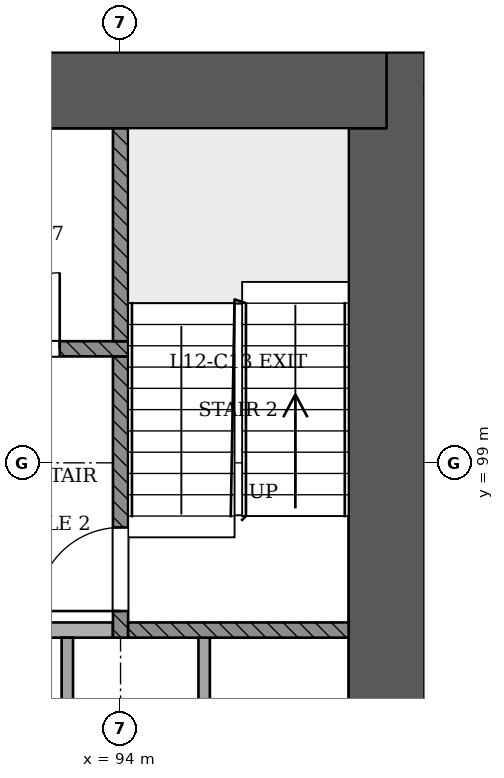
"""IFC4 building model, lengths in metres.
Left out: names, types, materials, properties, quantities, classifications, styles, units other than length and angle.
Written with IfcOpenShell. Run it as: python <this file> out.ifc"""

import sys

from ifc_helpers import new_model, si_unit, direction, frame, frame_2d, origin, place, context, subcontext, project, spatial, rectangle, extrude, element, fill, save


model = new_model("IFC4")
c1 = context("Model", 3, precision=1e-05, world=origin(), true_north=direction((0.0, 1.0)))
c2 = subcontext(c1, "Body", "Model", "MODEL_VIEW")
j1 = project(units=[si_unit("LENGTHUNIT", "METRE"), si_unit("PLANEANGLEUNIT", "RADIAN")], contexts=[c1])
p1 = place(None, origin())
s1 = spatial("IfcSite", under=j1, at=p1, CompositionType="ELEMENT")
p2 = place(p1, origin())
s2 = spatial("IfcBuilding", under=s1, at=p2, CompositionType="ELEMENT")
p3 = place(p2, frame((0.0, 0.0, 52.2)))
s3 = spatial("IfcBuildingStorey", under=s2, at=p3, CompositionType="ELEMENT", Elevation=52.2)
p4 = place(p3, frame((97.5, 92.9, 0.0), z_axis=(0.0, 0.0, 1.0), x_axis=(0.0, 1.0, 0.0)))
e1 = element("IfcWall", 1, at=p4, inside=s3, PredefinedType="SHEAR", context=c2, shape_type="SweptSolid", body=[
    extrude(rectangle(XDim=11.5, YDim=1.0, at=frame_2d((5.75, 0.0))), origin(), (0.0, 0.0, 1.0), 3.6),
])
p5 = place(p3, frame((97.5, 103.9, 0.0), z_axis=(0.0, 0.0, 1.0), x_axis=(-1.0, 0.0, 0.0)))
e2 = element("IfcWall", 2, at=p5, inside=s3, PredefinedType="SHEAR", context=c2, shape_type="SweptSolid", body=[
    extrude(rectangle(XDim=25.5, YDim=1.0, at=frame_2d((12.75, 0.0))), origin(), (0.0, 0.0, 1.0), 3.6),
])
p6 = place(p3, frame((86.05, 58.757, 0.0), z_axis=(0.0, 0.0, 1.0), x_axis=(0.499999296855, 0.866025809745, 0.0)))
e3 = element("IfcWall", 3, at=p6, inside=s3, PredefinedType="PARTITIONING", context=c2, shape_type="SweptSolid", body=[
    extrude(rectangle(XDim=43.792, YDim=0.15, at=frame_2d((21.896, 0.0))), origin(), (0.0, 0.0, 1.0), 2.7),
])
p7 = place(p6, frame((3.598, 0.0, 0.0)))
e4 = element("IfcOpeningElement", 4, at=p7, cuts=e3, PredefinedType="OPENING", context=c2, shape_type="SweptSolid", body=[
    extrude(rectangle(XDim=1.2, YDim=2.1, at=frame_2d((0.6, 1.05))), frame((0.0, 0.085, 0.0), z_axis=(0.0, -1.0, 0.0), x_axis=(1.0, 0.0, 0.0)), (0.0, 0.0, 1.0), 0.171),
])
p8 = place(p6, frame((11.176, 0.0, 0.0)))
e5 = element("IfcOpeningElement", 5, at=p8, cuts=e3, PredefinedType="OPENING", context=c2, shape_type="SweptSolid", body=[
    extrude(rectangle(XDim=1.0, YDim=2.1, at=frame_2d((0.5, 1.05))), frame((0.0, 0.085, 0.0), z_axis=(0.0, -1.0, 0.0), x_axis=(1.0, 0.0, 0.0)), (0.0, 0.0, 1.0), 0.171),
])
p9 = place(p6, frame((13.616, 0.0, 0.0)))
e6 = element("IfcOpeningElement", 6, at=p9, cuts=e3, PredefinedType="OPENING", context=c2, shape_type="SweptSolid", body=[
    extrude(rectangle(XDim=1.0, YDim=2.1, at=frame_2d((0.5, 1.05))), frame((0.0, 0.085, 0.0), z_axis=(0.0, -1.0, 0.0), x_axis=(1.0, 0.0, 0.0)), (0.0, 0.0, 1.0), 0.171),
])
p10 = place(p6, frame((20.176, 0.0, 0.0)))
e7 = element("IfcOpeningElement", 7, at=p10, cuts=e3, PredefinedType="OPENING", context=c2, shape_type="SweptSolid", body=[
    extrude(rectangle(XDim=1.0, YDim=2.1, at=frame_2d((0.5, 1.05))), frame((0.0, 0.085, 0.0), z_axis=(0.0, -1.0, 0.0), x_axis=(1.0, 0.0, 0.0)), (0.0, 0.0, 1.0), 0.171),
])
p11 = place(p6, frame((22.616, 0.0, 0.0)))
e8 = element("IfcOpeningElement", 8, at=p11, cuts=e3, PredefinedType="OPENING", context=c2, shape_type="SweptSolid", body=[
    extrude(rectangle(XDim=1.0, YDim=2.1, at=frame_2d((0.5, 1.05))), frame((0.0, 0.085, 0.0), z_axis=(0.0, -1.0, 0.0), x_axis=(1.0, 0.0, 0.0)), (0.0, 0.0, 1.0), 0.171),
])
p12 = place(p6, frame((29.176, 0.0, 0.0)))
e9 = element("IfcOpeningElement", 9, at=p12, cuts=e3, PredefinedType="OPENING", context=c2, shape_type="SweptSolid", body=[
    extrude(rectangle(XDim=1.0, YDim=2.1, at=frame_2d((0.5, 1.05))), frame((0.0, 0.085, 0.0), z_axis=(0.0, -1.0, 0.0), x_axis=(1.0, 0.0, 0.0)), (0.0, 0.0, 1.0), 0.171),
])
p13 = place(p6, frame((31.616, 0.0, 0.0)))
e10 = element("IfcOpeningElement", 10, at=p13, cuts=e3, PredefinedType="OPENING", context=c2, shape_type="SweptSolid", body=[
    extrude(rectangle(XDim=1.0, YDim=2.1, at=frame_2d((0.5, 1.05))), frame((0.0, 0.085, 0.0), z_axis=(0.0, -1.0, 0.0), x_axis=(1.0, 0.0, 0.0)), (0.0, 0.0, 1.0), 0.171),
])
p14 = place(p6, frame((38.176, 0.0, 0.0)))
e11 = element("IfcOpeningElement", 11, at=p14, cuts=e3, PredefinedType="OPENING", context=c2, shape_type="SweptSolid", body=[
    extrude(rectangle(XDim=1.0, YDim=2.1, at=frame_2d((0.5, 1.05))), frame((0.0, 0.085, 0.0), z_axis=(0.0, -1.0, 0.0), x_axis=(1.0, 0.0, 0.0)), (0.0, 0.0, 1.0), 0.171),
])
p15 = place(p6, frame((41.344, 0.0, 0.0)))
e12 = element("IfcOpeningElement", 12, at=p15, cuts=e3, PredefinedType="OPENING", context=c2, shape_type="SweptSolid", body=[
    extrude(rectangle(XDim=1.0, YDim=2.1, at=frame_2d((0.5, 1.05))), frame((0.0, 0.085, 0.0), z_axis=(0.0, -1.0, 0.0), x_axis=(1.0, 0.0, 0.0)), (0.0, 0.0, 1.0), 0.171),
])
for number, where, z_axis, x_axis in (
    (13, (93.3, 93.4, 0.0), (0.0, 0.0, 1.0), (0.0, 1.0, 0.0)),
    (14, (95.1, 93.4, 0.0), (0.0, 0.0, 1.0), (0.0, 1.0, 0.0)),
):
    element("IfcWall", number, at=place(p3, frame(where, z_axis=z_axis, x_axis=x_axis)), inside=s3, PredefinedType="PARTITIONING", context=c2, shape_type="SweptSolid", body=[
        extrude(rectangle(XDim=3.3, YDim=0.15, at=frame_2d((1.65, 0.0))), origin(), (0.0, 0.0, 1.0), 3.1),
    ])
p16 = place(p3, frame((91.5, 96.8, 0.0), z_axis=(0.0, 0.0, 1.0), x_axis=(1.0, 0.0, 0.0)))
e15 = element("IfcWall", 15, at=p16, inside=s3, PredefinedType="PARTITIONING", context=c2, shape_type="SweptSolid", body=[
    extrude(rectangle(XDim=2.4, YDim=0.2, at=frame_2d((1.2, 0.0))), origin(), (0.0, 0.0, 1.0), 3.1),
])
p17 = place(p3, frame((94.0, 96.7, 0.0), z_axis=(0.0, 0.0, 1.0), x_axis=(0.0, 1.0, 0.0)))
e16 = element("IfcWall", 16, at=p17, inside=s3, PredefinedType="SOLIDWALL", context=c2, shape_type="SweptSolid", body=[
    extrude(rectangle(XDim=3.7, YDim=0.2, at=frame_2d((1.85, 0.0))), origin(), (0.0, 0.0, 1.0), 3.1),
])
p18 = place(p17, frame((0.35, 0.0, 0.0)))
e17 = element("IfcOpeningElement", 17, at=p18, cuts=e16, PredefinedType="OPENING", context=c2, shape_type="SweptSolid", body=[
    extrude(rectangle(XDim=1.1, YDim=2.1, at=frame_2d((0.55, 1.05))), frame((0.0, 0.11, 0.0), z_axis=(0.0, -1.0, 0.0), x_axis=(1.0, 0.0, 0.0)), (0.0, 0.0, 1.0), 0.221),
])
p19 = place(p3, frame((94.1, 96.8, 0.0), z_axis=(0.0, 0.0, 1.0), x_axis=(1.0, 0.0, 0.0)))
e18 = element("IfcWall", 18, at=p19, inside=s3, PredefinedType="SOLIDWALL", context=c2, shape_type="SweptSolid", body=[
    extrude(rectangle(XDim=2.9, YDim=0.2, at=frame_2d((1.45, 0.0))), origin(), (0.0, 0.0, 1.0), 3.1),
])
p20 = place(p3, frame((75.9, 100.5, 0.0), z_axis=(0.0, 0.0, 1.0), x_axis=(1.0, 0.0, 0.0)))
e19 = element("IfcWall", 19, at=p20, inside=s3, PredefinedType="SOLIDWALL", context=c2, shape_type="SweptSolid", body=[
    extrude(rectangle(XDim=18.2, YDim=0.2, at=frame_2d((9.1, 0.0))), origin(), (0.0, 0.0, 1.0), 3.1),
])
p21 = place(p20, frame((2.6, 0.0, 0.0)))
e20 = element("IfcOpeningElement", 20, at=p21, cuts=e19, PredefinedType="OPENING", context=c2, shape_type="SweptSolid", body=[
    extrude(rectangle(XDim=1.1, YDim=2.1, at=frame_2d((0.55, 1.05))), frame((0.0, 0.11, 0.0), z_axis=(0.0, -1.0, 0.0), x_axis=(1.0, 0.0, 0.0)), (0.0, 0.0, 1.0), 0.221),
])
p22 = place(p20, frame((4.5, 0.0, 0.0)))
e21 = element("IfcOpeningElement", 21, at=p22, cuts=e19, PredefinedType="OPENING", context=c2, shape_type="SweptSolid", body=[
    extrude(rectangle(XDim=1.1, YDim=2.1, at=frame_2d((0.55, 1.05))), frame((0.0, 0.11, 0.0), z_axis=(0.0, -1.0, 0.0), x_axis=(1.0, 0.0, 0.0)), (0.0, 0.0, 1.0), 0.221),
])
p23 = place(p20, frame((6.4, 0.0, 0.0)))
e22 = element("IfcOpeningElement", 22, at=p23, cuts=e19, PredefinedType="OPENING", context=c2, shape_type="SweptSolid", body=[
    extrude(rectangle(XDim=1.1, YDim=2.1, at=frame_2d((0.55, 1.05))), frame((0.0, 0.11, 0.0), z_axis=(0.0, -1.0, 0.0), x_axis=(1.0, 0.0, 0.0)), (0.0, 0.0, 1.0), 0.221),
])
p24 = place(p20, frame((8.3, 0.0, 0.0)))
e23 = element("IfcOpeningElement", 23, at=p24, cuts=e19, PredefinedType="OPENING", context=c2, shape_type="SweptSolid", body=[
    extrude(rectangle(XDim=1.1, YDim=2.1, at=frame_2d((0.55, 1.05))), frame((0.0, 0.11, 0.0), z_axis=(0.0, -1.0, 0.0), x_axis=(1.0, 0.0, 0.0)), (0.0, 0.0, 1.0), 0.221),
])
p25 = place(p20, frame((10.2, 0.0, 0.0)))
e24 = element("IfcOpeningElement", 24, at=p25, cuts=e19, PredefinedType="OPENING", context=c2, shape_type="SweptSolid", body=[
    extrude(rectangle(XDim=1.1, YDim=2.1, at=frame_2d((0.55, 1.05))), frame((0.0, 0.11, 0.0), z_axis=(0.0, -1.0, 0.0), x_axis=(1.0, 0.0, 0.0)), (0.0, 0.0, 1.0), 0.221),
])
p26 = place(p20, frame((12.1, 0.0, 0.0)))
e25 = element("IfcOpeningElement", 25, at=p26, cuts=e19, PredefinedType="OPENING", context=c2, shape_type="SweptSolid", body=[
    extrude(rectangle(XDim=1.1, YDim=2.1, at=frame_2d((0.55, 1.05))), frame((0.0, 0.11, 0.0), z_axis=(0.0, -1.0, 0.0), x_axis=(1.0, 0.0, 0.0)), (0.0, 0.0, 1.0), 0.221),
])
p27 = place(p20, frame((14.0, 0.0, 0.0)))
e26 = element("IfcOpeningElement", 26, at=p27, cuts=e19, PredefinedType="OPENING", context=c2, shape_type="SweptSolid", body=[
    extrude(rectangle(XDim=1.1, YDim=2.1, at=frame_2d((0.55, 1.05))), frame((0.0, 0.11, 0.0), z_axis=(0.0, -1.0, 0.0), x_axis=(1.0, 0.0, 0.0)), (0.0, 0.0, 1.0), 0.221),
])
p28 = place(p20, frame((0.65, 0.0, 0.0)))
e27 = element("IfcOpeningElement", 27, at=p28, cuts=e19, PredefinedType="OPENING", context=c2, shape_type="SweptSolid", body=[
    extrude(rectangle(XDim=1.0, YDim=2.1, at=frame_2d((0.5, 1.05))), frame((0.0, 0.11, 0.0), z_axis=(0.0, -1.0, 0.0), x_axis=(1.0, 0.0, 0.0)), (0.0, 0.0, 1.0), 0.221),
])
p29 = place(p20, frame((16.3, 0.0, 0.0)))
e28 = element("IfcOpeningElement", 28, at=p29, cuts=e19, PredefinedType="OPENING", context=c2, shape_type="SweptSolid", body=[
    extrude(rectangle(XDim=1.0, YDim=2.1, at=frame_2d((0.5, 1.05))), frame((0.0, 0.11, 0.0), z_axis=(0.0, -1.0, 0.0), x_axis=(1.0, 0.0, 0.0)), (0.0, 0.0, 1.0), 0.221),
])
p30 = place(p3, frame((94.0, 100.6, 0.0), z_axis=(0.0, 0.0, 1.0), x_axis=(0.0, 1.0, 0.0)))
e29 = element("IfcWall", 29, at=p30, inside=s3, PredefinedType="SOLIDWALL", context=c2, shape_type="SweptSolid", body=[
    extrude(rectangle(XDim=2.8, YDim=0.2, at=frame_2d((1.4, 0.0))), origin(), (0.0, 0.0, 1.0), 3.1),
])
p31 = place(p18, origin())
e30 = element("IfcDoor", 30, at=p31, inside=s3, OperationType="SINGLE_SWING_LEFT", PredefinedType="NOTDEFINED", context=c2, shape_type="SweptSolid", body=[
    extrude(rectangle(XDim=1.1, YDim=2.1, at=frame_2d((0.55, 1.05))), frame((0.0, 0.025, 0.0), z_axis=(0.0, -1.0, 0.0), x_axis=(1.0, 0.0, 0.0)), (0.0, 0.0, 1.0), 0.05),
])
fill(e17, e30)
p32 = place(p29, origin())
e31 = element("IfcDoor", 31, at=p32, inside=s3, OperationType="SINGLE_SWING_RIGHT", PredefinedType="NOTDEFINED", context=c2, shape_type="SweptSolid", body=[
    extrude(rectangle(XDim=1.0, YDim=2.1, at=frame_2d((0.5, 1.05))), frame((0.0, 0.025, 0.0), z_axis=(0.0, -1.0, 0.0), x_axis=(1.0, 0.0, 0.0)), (0.0, 0.0, 1.0), 0.05),
])
fill(e28, e31)
save(model, sys.argv[1])
